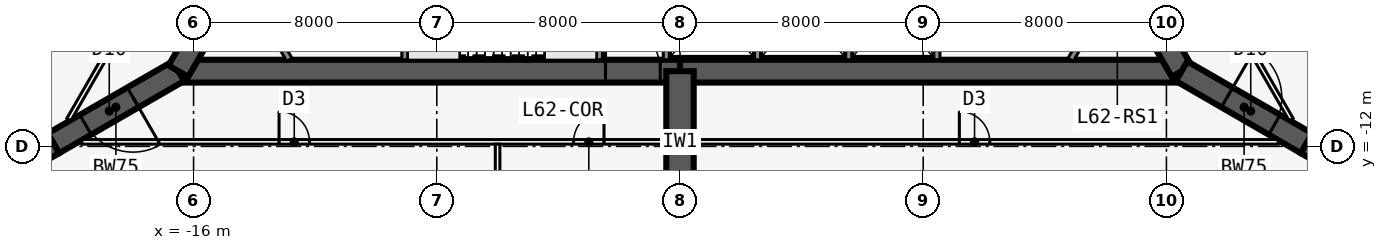
"""IFC4 building model, lengths in metres.
Left out: names, types, materials, properties, quantities, classifications, styles, units other than length and angle.
Written with IfcOpenShell. Run it as: python <this file> out.ifc"""

import sys

from ifc_helpers import new_model, si_unit, direction, frame, frame_2d, origin, place, context, subcontext, project, spatial, rectangle, extrude, element, fill, save


model = new_model("IFC4")
c1 = context("Model", 3, precision=1e-05, world=origin(), true_north=direction((0.0, 1.0)))
c2 = subcontext(c1, "Body", "Model", "MODEL_VIEW")
j1 = project(units=[si_unit("LENGTHUNIT", "METRE"), si_unit("PLANEANGLEUNIT", "RADIAN")], contexts=[c1])
p1 = place(None, origin())
s1 = spatial("IfcSite", under=j1, at=p1, CompositionType="ELEMENT")
p2 = place(p1, origin())
s2 = spatial("IfcBuilding", under=s1, at=p2, CompositionType="ELEMENT")
p3 = place(p2, frame((0.0, 0.0, 233.3)))
s3 = spatial("IfcBuildingStorey", under=s2, at=p3, CompositionType="ELEMENT", Elevation=233.3)
p4 = place(p3, frame((-16.5, -9.526, 0.0), z_axis=(0.0, 0.0, 1.0), x_axis=(1.0, 0.0, 0.0)))
e1 = element("IfcWall", 1, at=p4, inside=s3, PredefinedType="SHEAR", context=c2, shape_type="SweptSolid", body=[
    extrude(rectangle(XDim=16.5, YDim=0.75, at=frame_2d((8.25, 0.0))), origin(), (0.0, 0.0, 1.0), 6.0),
])
p5 = place(p4, frame((14.05, 0.0, 0.0)))
e2 = element("IfcOpeningElement", 2, at=p5, cuts=e1, PredefinedType="OPENING", context=c2, shape_type="SweptSolid", body=[
    extrude(rectangle(XDim=1.8, YDim=2.13, at=frame_2d((0.9, 1.065))), frame((0.0, 0.385, 0.0), z_axis=(0.0, -1.0, 0.0), x_axis=(1.0, 0.0, 0.0)), (0.0, 0.0, 1.0), 0.77),
])
p6 = place(p3, frame((0.0, -9.526, 0.0), z_axis=(0.0, 0.0, 1.0), x_axis=(1.0, 0.0, 0.0)))
e3 = element("IfcWall", 3, at=p6, inside=s3, PredefinedType="SHEAR", context=c2, shape_type="SweptSolid", body=[
    extrude(rectangle(XDim=16.5, YDim=0.75, at=frame_2d((8.25, 0.0))), origin(), (0.0, 0.0, 1.0), 6.0),
])
p7 = place(p3, frame((-9.05, -5.951, 0.0), z_axis=(0.0, 0.0, 1.0), x_axis=(0.0, -1.0, 0.0)))
e4 = element("IfcWall", 4, at=p7, inside=s3, PredefinedType="SOLIDWALL", context=c2, shape_type="SweptSolid", body=[
    extrude(rectangle(XDim=3.2, YDim=0.2, at=frame_2d((1.6, 0.0))), origin(), (0.0, 0.0, 1.0), 5.75),
])
p8 = place(p3, frame((-2.65, -5.951, 0.0), z_axis=(0.0, 0.0, 1.0), x_axis=(0.0, -1.0, 0.0)))
e5 = element("IfcWall", 5, at=p8, inside=s3, PredefinedType="SOLIDWALL", context=c2, shape_type="SweptSolid", body=[
    extrude(rectangle(XDim=3.2, YDim=0.2, at=frame_2d((1.6, 0.0))), origin(), (0.0, 0.0, 1.0), 5.75),
])
p9 = place(p8, frame((1.6, 0.0, 0.0)))
e6 = element("IfcOpeningElement", 6, at=p9, cuts=e5, PredefinedType="OPENING", context=c2, shape_type="SweptSolid", body=[
    extrude(rectangle(XDim=1.0, YDim=2.13, at=frame_2d((0.5, 1.065))), frame((0.0, 0.11, 0.0), z_axis=(0.0, -1.0, 0.0), x_axis=(1.0, 0.0, 0.0)), (0.0, 0.0, 1.0), 0.22),
])
for number, where, z_axis, x_axis in (
    (7, (-0.45, -5.951, 0.0), (0.0, 0.0, 1.0), (0.0, -1.0, 0.0)),
    (8, (2.55, -5.951, 0.0), (0.0, 0.0, 1.0), (0.0, -1.0, 0.0)),
    (9, (5.55, -5.951, 0.0), (0.0, 0.0, 1.0), (0.0, -1.0, 0.0)),
    (10, (8.45, -5.951, 0.0), (0.0, 0.0, 1.0), (0.0, -1.0, 0.0)),
):
    element("IfcWall", number, at=place(p3, frame(where, z_axis=z_axis, x_axis=x_axis)), inside=s3, PredefinedType="SOLIDWALL", context=c2, shape_type="SweptSolid", body=[
        extrude(rectangle(XDim=3.2, YDim=0.2, at=frame_2d((1.6, 0.0))), origin(), (0.0, 0.0, 1.0), 5.75),
    ])
p10 = place(p3, frame((16.5, -9.526, 0.0), z_axis=(0.0, 0.0, 1.0), x_axis=(-0.499996545922, 0.866027397988, 0.0)))
e11 = element("IfcWall", 11, at=p10, inside=s3, PredefinedType="SHEAR", context=c2, shape_type="SweptSolid", body=[
    extrude(rectangle(XDim=16.5, YDim=0.75, at=frame_2d((8.25, 0.0))), origin(), (0.0, 0.0, 1.0), 6.0),
])
p11 = place(p10, frame((14.15, 0.0, 0.0)))
e12 = element("IfcOpeningElement", 12, at=p11, cuts=e11, PredefinedType="OPENING", context=c2, shape_type="SweptSolid", body=[
    extrude(rectangle(XDim=1.8, YDim=2.13, at=frame_2d((0.9, 1.065))), frame((0.0, 0.385, 0.0), z_axis=(0.0, -1.0, 0.0), x_axis=(1.0, 0.0, 0.0)), (0.0, 0.0, 1.0), 0.77),
])
p12 = place(p10, frame((12.6, 0.0, 0.0)))
e13 = element("IfcOpeningElement", 13, at=p12, cuts=e11, PredefinedType="OPENING", context=c2, shape_type="SweptSolid", body=[
    extrude(rectangle(XDim=1.0, YDim=2.13, at=frame_2d((0.5, 1.065))), frame((0.0, 0.385, 0.0), z_axis=(0.0, -1.0, 0.0), x_axis=(1.0, 0.0, 0.0)), (0.0, 0.0, 1.0), 0.77),
])
p13 = place(p3, frame((-8.25, 4.763, 0.0), z_axis=(0.0, 0.0, 1.0), x_axis=(-0.499996545922, -0.866027397988, 0.0)))
e14 = element("IfcWall", 14, at=p13, inside=s3, PredefinedType="SHEAR", context=c2, shape_type="SweptSolid", body=[
    extrude(rectangle(XDim=16.5, YDim=0.75, at=frame_2d((8.25, 0.0))), origin(), (0.0, 0.0, 1.0), 6.0),
])
p14 = place(p3, frame((16.5, -9.526, 0.0), z_axis=(0.0, 0.0, 1.0), x_axis=(0.866031398331, -0.499989616998, 0.0)))
e15 = element("IfcWall", 15, at=p14, inside=s3, PredefinedType="SHEAR", context=c2, shape_type="SweptSolid", body=[
    extrude(rectangle(XDim=4.746, YDim=0.75, at=frame_2d((2.373, 0.0))), origin(), (0.0, 0.0, 1.0), 6.0),
])
p15 = place(p14, frame((1.725, 0.0, 0.0)))
e16 = element("IfcOpeningElement", 16, at=p15, cuts=e15, PredefinedType="OPENING", context=c2, shape_type="SweptSolid", body=[
    extrude(rectangle(XDim=1.8, YDim=2.13, at=frame_2d((0.9, 1.065))), frame((0.0, 0.385, 0.0), z_axis=(0.0, -1.0, 0.0), x_axis=(1.0, 0.0, 0.0)), (0.0, 0.0, 1.0), 0.77),
])
p16 = place(p3, frame((20.61, -11.899, 0.0), z_axis=(0.0, 0.0, 1.0), x_axis=(0.866009537788, -0.500027479704, 0.0)))
e17 = element("IfcWall", 17, at=p16, inside=s3, PredefinedType="SHEAR", context=c2, shape_type="SweptSolid", body=[
    extrude(rectangle(XDim=1.155, YDim=0.75, at=frame_2d((0.577, 0.0))), origin(), (0.0, 0.0, 1.0), 6.0),
])
p17 = place(p3, frame((-16.5, -9.526, 0.0), z_axis=(0.0, 0.0, 1.0), x_axis=(-0.866031398331, -0.499989616998, 0.0)))
e18 = element("IfcWall", 18, at=p17, inside=s3, PredefinedType="SHEAR", context=c2, shape_type="SweptSolid", body=[
    extrude(rectangle(XDim=4.746, YDim=0.75, at=frame_2d((2.373, 0.0))), origin(), (0.0, 0.0, 1.0), 6.0),
])
p18 = place(p17, frame((1.725, 0.0, 0.0)))
e19 = element("IfcOpeningElement", 19, at=p18, cuts=e18, PredefinedType="OPENING", context=c2, shape_type="SweptSolid", body=[
    extrude(rectangle(XDim=1.8, YDim=2.13, at=frame_2d((0.9, 1.065))), frame((0.0, 0.385, 0.0), z_axis=(0.0, -1.0, 0.0), x_axis=(1.0, 0.0, 0.0)), (0.0, 0.0, 1.0), 0.77),
])
p19 = place(p3, frame((-20.61, -11.899, 0.0), z_axis=(0.0, 0.0, 1.0), x_axis=(-0.866009537788, -0.500027479704, 0.0)))
e20 = element("IfcWall", 20, at=p19, inside=s3, PredefinedType="SHEAR", context=c2, shape_type="SweptSolid", body=[
    extrude(rectangle(XDim=1.155, YDim=0.75, at=frame_2d((0.577, 0.0))), origin(), (0.0, 0.0, 1.0), 6.0),
])
p20 = place(p3, frame((0.0, -9.526, 0.0), z_axis=(0.0, 0.0, 1.0), x_axis=(0.0, -1.0, 0.0)))
e21 = element("IfcWall", 21, at=p20, inside=s3, PredefinedType="SHEAR", context=c2, shape_type="SweptSolid", body=[
    extrude(rectangle(XDim=8.154, YDim=0.9, at=frame_2d((4.077, 0.0))), origin(), (0.0, 0.0, 1.0), 6.0),
])
p21 = place(p3, frame((-19.677, -11.851, 0.0), z_axis=(0.0, 0.0, 1.0), x_axis=(1.0, 0.0, 0.0)))
e22 = element("IfcWall", 22, at=p21, inside=s3, PredefinedType="PARTITIONING", context=c2, shape_type="SweptSolid", body=[
    extrude(rectangle(XDim=39.354, YDim=0.15, at=frame_2d((19.677, 0.0))), origin(), (0.0, 0.0, 1.0), 5.75),
])
p22 = place(p21, frame((6.489, 0.0, 0.0)))
e23 = element("IfcOpeningElement", 23, at=p22, cuts=e22, PredefinedType="OPENING", context=c2, shape_type="SweptSolid", body=[
    extrude(rectangle(XDim=1.0, YDim=2.13, at=frame_2d((0.5, 1.065))), frame((0.0, 0.085, 0.0), z_axis=(0.0, -1.0, 0.0), x_axis=(1.0, 0.0, 0.0)), (0.0, 0.0, 1.0), 0.17),
])
p23 = place(p21, frame((16.177, 0.0, 0.0)))
e24 = element("IfcOpeningElement", 24, at=p23, cuts=e22, PredefinedType="OPENING", context=c2, shape_type="SweptSolid", body=[
    extrude(rectangle(XDim=1.0, YDim=2.13, at=frame_2d((0.5, 1.065))), frame((0.0, 0.085, 0.0), z_axis=(0.0, -1.0, 0.0), x_axis=(1.0, 0.0, 0.0)), (0.0, 0.0, 1.0), 0.17),
])
p24 = place(p21, frame((28.865, 0.0, 0.0)))
e25 = element("IfcOpeningElement", 25, at=p24, cuts=e22, PredefinedType="OPENING", context=c2, shape_type="SweptSolid", body=[
    extrude(rectangle(XDim=1.0, YDim=2.13, at=frame_2d((0.5, 1.065))), frame((0.0, 0.085, 0.0), z_axis=(0.0, -1.0, 0.0), x_axis=(1.0, 0.0, 0.0)), (0.0, 0.0, 1.0), 0.17),
])
p25 = place(p3, frame((-6.0, -11.926, 0.0), z_axis=(0.0, 0.0, 1.0), x_axis=(0.0, -1.0, 0.0)))
e26 = element("IfcWall", 26, at=p25, inside=s3, PredefinedType="PARTITIONING", context=c2, shape_type="SweptSolid", body=[
    extrude(rectangle(XDim=7.77, YDim=0.15, at=frame_2d((3.885, 0.0))), origin(), (0.0, 0.0, 1.0), 5.75),
])
p26 = place(p3, frame((20.102, -11.115, 0.0), z_axis=(0.0, 0.0, 1.0), x_axis=(-0.500000265775, 0.866025250339, 0.0)))
e27 = element("IfcWall", 27, at=p26, inside=s3, PredefinedType="PARTITIONING", context=c2, shape_type="SweptSolid", body=[
    extrude(rectangle(XDim=39.354, YDim=0.15, at=frame_2d((19.677, 0.0))), origin(), (0.0, 0.0, 1.0), 5.75),
])
p27 = place(p26, frame((9.489, 0.0, 0.0)))
e28 = element("IfcOpeningElement", 28, at=p27, cuts=e27, PredefinedType="OPENING", context=c2, shape_type="SweptSolid", body=[
    extrude(rectangle(XDim=1.0, YDim=2.13, at=frame_2d((0.5, 1.065))), frame((0.0, 0.085, 0.0), z_axis=(0.0, -1.0, 0.0), x_axis=(1.0, 0.0, 0.0)), (0.0, 0.0, 1.0), 0.17),
])
p28 = place(p26, frame((21.177, 0.0, 0.0)))
e29 = element("IfcOpeningElement", 29, at=p28, cuts=e27, PredefinedType="OPENING", context=c2, shape_type="SweptSolid", body=[
    extrude(rectangle(XDim=1.0, YDim=2.13, at=frame_2d((0.5, 1.065))), frame((0.0, 0.085, 0.0), z_axis=(0.0, -1.0, 0.0), x_axis=(1.0, 0.0, 0.0)), (0.0, 0.0, 1.0), 0.17),
])
p29 = place(p26, frame((30.865, 0.0, 0.0)))
e30 = element("IfcOpeningElement", 30, at=p29, cuts=e27, PredefinedType="OPENING", context=c2, shape_type="SweptSolid", body=[
    extrude(rectangle(XDim=1.0, YDim=2.13, at=frame_2d((0.5, 1.065))), frame((0.0, 0.085, 0.0), z_axis=(0.0, -1.0, 0.0), x_axis=(1.0, 0.0, 0.0)), (0.0, 0.0, 1.0), 0.17),
])
p30 = place(p3, frame((-0.425, 22.966, 0.0), z_axis=(0.0, 0.0, 1.0), x_axis=(-0.500000265775, -0.866025250339, 0.0)))
e31 = element("IfcWall", 31, at=p30, inside=s3, PredefinedType="PARTITIONING", context=c2, shape_type="SweptSolid", body=[
    extrude(rectangle(XDim=39.354, YDim=0.15, at=frame_2d((19.677, 0.0))), origin(), (0.0, 0.0, 1.0), 5.75),
])
p31 = place(p30, frame((7.489, 0.0, 0.0)))
e32 = element("IfcOpeningElement", 32, at=p31, cuts=e31, PredefinedType="OPENING", context=c2, shape_type="SweptSolid", body=[
    extrude(rectangle(XDim=1.0, YDim=2.13, at=frame_2d((0.5, 1.065))), frame((0.0, 0.085, 0.0), z_axis=(0.0, -1.0, 0.0), x_axis=(1.0, 0.0, 0.0)), (0.0, 0.0, 1.0), 0.17),
])
p32 = place(p30, frame((17.177, 0.0, 0.0)))
e33 = element("IfcOpeningElement", 33, at=p32, cuts=e31, PredefinedType="OPENING", context=c2, shape_type="SweptSolid", body=[
    extrude(rectangle(XDim=1.0, YDim=2.13, at=frame_2d((0.5, 1.065))), frame((0.0, 0.085, 0.0), z_axis=(0.0, -1.0, 0.0), x_axis=(1.0, 0.0, 0.0)), (0.0, 0.0, 1.0), 0.17),
])
p33 = place(p30, frame((28.865, 0.0, 0.0)))
e34 = element("IfcOpeningElement", 34, at=p33, cuts=e31, PredefinedType="OPENING", context=c2, shape_type="SweptSolid", body=[
    extrude(rectangle(XDim=1.0, YDim=2.13, at=frame_2d((0.5, 1.065))), frame((0.0, 0.085, 0.0), z_axis=(0.0, -1.0, 0.0), x_axis=(1.0, 0.0, 0.0)), (0.0, 0.0, 1.0), 0.17),
])
for number, where, z_axis, x_axis in (
    (35, (14.349, -6.551, 0.0), (0.0, 0.0, 1.0), (-0.5, -0.866, 0.0)),
    (36, (-12.848, -9.151, 0.0), (0.0, 0.0, 1.0), (-0.5, 0.866, 0.0)),
):
    element("IfcWall", number, at=place(p3, frame(where, z_axis=z_axis, x_axis=x_axis)), inside=s3, PredefinedType="SOLIDWALL", context=c2, shape_type="SweptSolid", body=[
        extrude(rectangle(XDim=3.002, YDim=0.2, at=frame_2d((1.501, 0.0))), origin(), (0.0, 0.0, 1.0), 5.75),
    ])
p34 = place(p22, origin())
e37 = element("IfcDoor", 37, at=p34, inside=s3, OperationType="SINGLE_SWING_LEFT", PredefinedType="DOOR", context=c2, shape_type="SweptSolid", body=[
    extrude(rectangle(XDim=1.0, YDim=2.13, at=frame_2d((0.5, 1.065))), frame((0.0, 0.025, 0.0), z_axis=(0.0, -1.0, 0.0), x_axis=(1.0, 0.0, 0.0)), (0.0, 0.0, 1.0), 0.05),
])
fill(e23, e37)
p35 = place(p23, origin())
e38 = element("IfcDoor", 38, at=p35, inside=s3, OperationType="SINGLE_SWING_RIGHT", PredefinedType="DOOR", context=c2, shape_type="SweptSolid", body=[
    extrude(rectangle(XDim=1.0, YDim=2.13, at=frame_2d((0.5, 1.065))), frame((0.0, 0.025, 0.0), z_axis=(0.0, -1.0, 0.0), x_axis=(1.0, 0.0, 0.0)), (0.0, 0.0, 1.0), 0.05),
])
fill(e24, e38)
p36 = place(p24, origin())
e39 = element("IfcDoor", 39, at=p36, inside=s3, OperationType="SINGLE_SWING_LEFT", PredefinedType="DOOR", context=c2, shape_type="SweptSolid", body=[
    extrude(rectangle(XDim=1.0, YDim=2.13, at=frame_2d((0.5, 1.065))), frame((0.0, 0.025, 0.0), z_axis=(0.0, -1.0, 0.0), x_axis=(1.0, 0.0, 0.0)), (0.0, 0.0, 1.0), 0.05),
])
fill(e25, e39)
p37 = place(p5, origin())
e40 = element("IfcDoor", 40, at=p37, inside=s3, OperationType="DOUBLE_DOOR_SINGLE_SWING", PredefinedType="DOOR", context=c2, shape_type="SweptSolid", body=[
    extrude(rectangle(XDim=1.8, YDim=2.13, at=frame_2d((0.9, 1.065))), frame((0.0, 0.025, 0.0), z_axis=(0.0, -1.0, 0.0), x_axis=(1.0, 0.0, 0.0)), (0.0, 0.0, 1.0), 0.05),
])
fill(e2, e40)
p38 = place(p15, origin())
e41 = element("IfcDoor", 41, at=p38, inside=s3, OperationType="DOUBLE_DOOR_DOUBLE_SWING", PredefinedType="DOOR", context=c2, shape_type="SweptSolid", body=[
    extrude(rectangle(XDim=1.8, YDim=2.13, at=frame_2d((0.9, 1.065))), frame((0.0, 0.025, 0.0), z_axis=(0.0, -1.0, 0.0), x_axis=(1.0, 0.0, 0.0)), (0.0, 0.0, 1.0), 0.05),
])
fill(e16, e41)
p39 = place(p18, origin())
e42 = element("IfcDoor", 42, at=p39, inside=s3, OperationType="DOUBLE_DOOR_DOUBLE_SWING", PredefinedType="DOOR", context=c2, shape_type="SweptSolid", body=[
    extrude(rectangle(XDim=1.8, YDim=2.13, at=frame_2d((0.9, 1.065))), frame((0.0, 0.025, 0.0), z_axis=(0.0, -1.0, 0.0), x_axis=(1.0, 0.0, 0.0)), (0.0, 0.0, 1.0), 0.05),
])
fill(e19, e42)
save(model, sys.argv[1])
